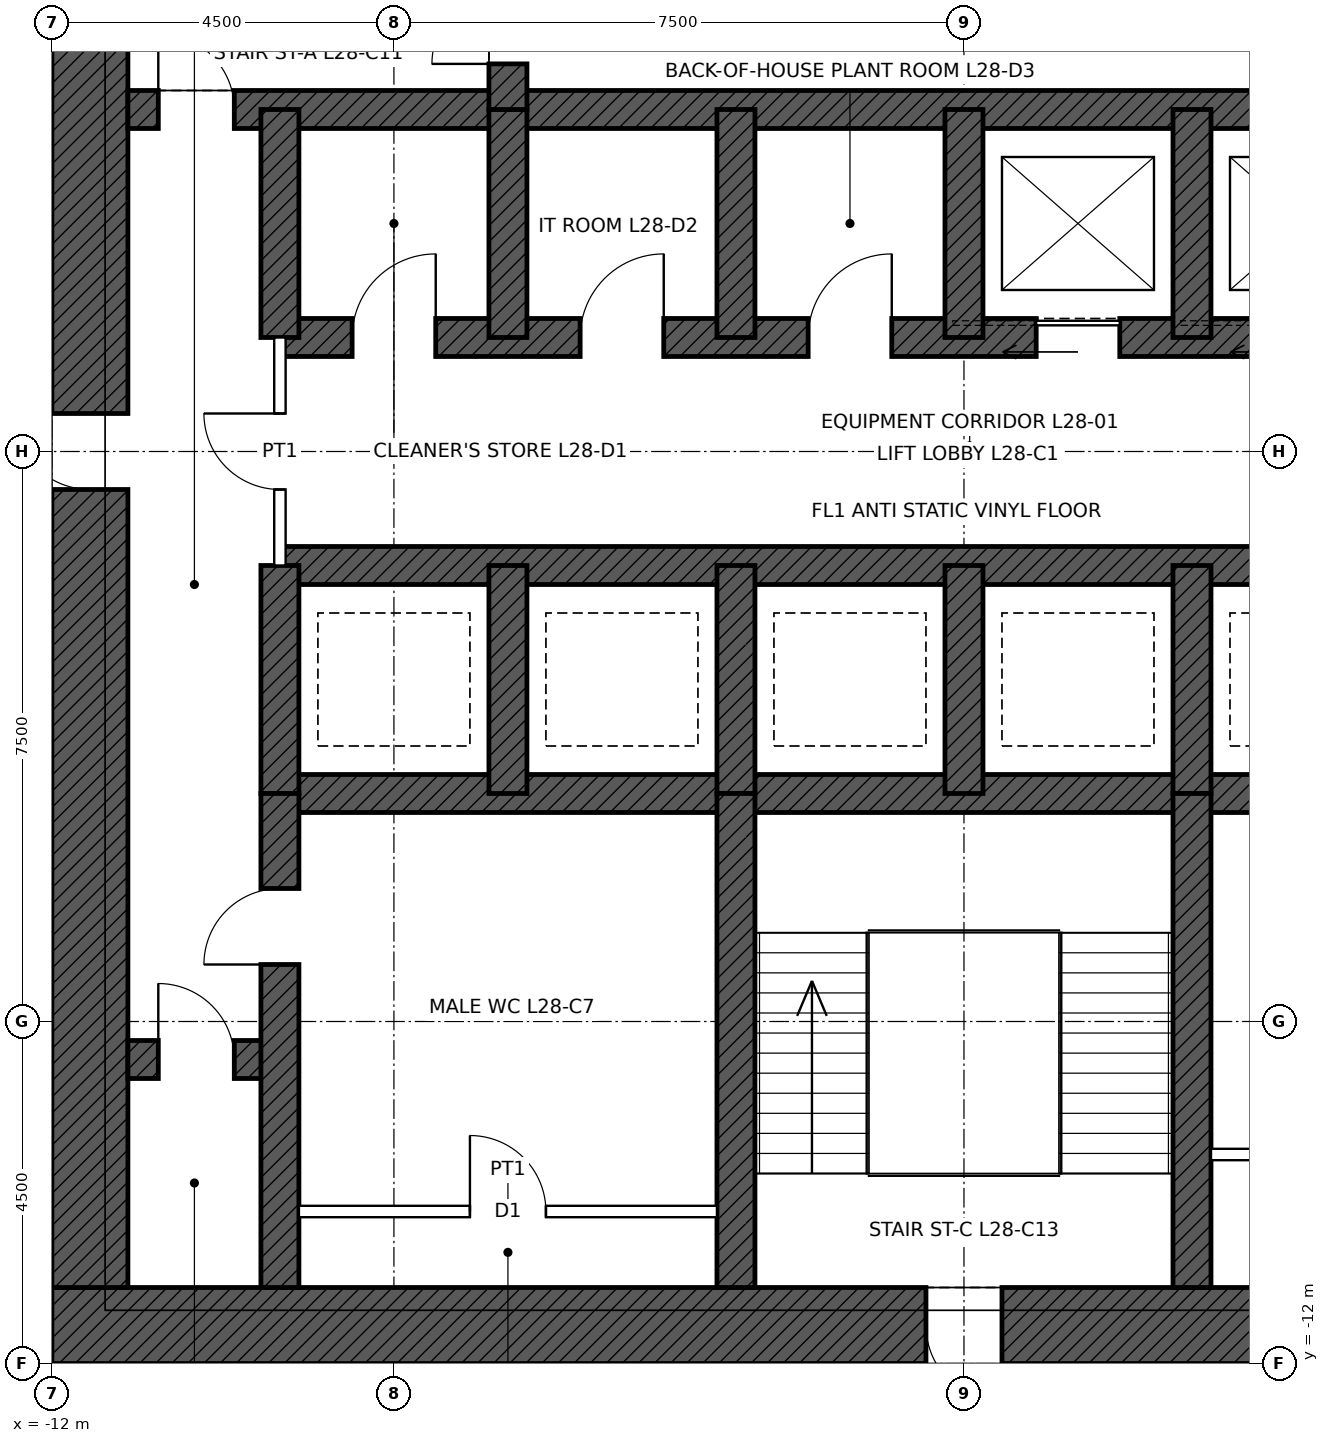
"""IFC4 building model, lengths in metres.
Left out: names, types, materials, properties, quantities, classifications, styles, units other than length and angle.
Written with IfcOpenShell. Run it as: python <this file> out.ifc"""

import sys

from ifc_helpers import new_model, si_unit, direction, frame, frame_2d, origin, place, context, subcontext, project, spatial, rectangle, extrude, element, fill, save


model = new_model("IFC4")
c1 = context("Model", 3, precision=1e-05, world=origin(), true_north=direction((0.0, 1.0)))
c2 = subcontext(c1, "Body", "Model", "MODEL_VIEW")
j1 = project(units=[si_unit("LENGTHUNIT", "METRE"), si_unit("PLANEANGLEUNIT", "RADIAN")], contexts=[c1])
p1 = place(None, origin())
s1 = spatial("IfcSite", under=j1, at=p1, CompositionType="ELEMENT")
p2 = place(p1, origin())
s2 = spatial("IfcBuilding", under=s1, at=p2, CompositionType="ELEMENT")
p3 = place(p2, frame((0.0, 0.0, 140.4)))
s3 = spatial("IfcBuildingStorey", under=s2, at=p3, CompositionType="ELEMENT", Elevation=140.4)
p4 = place(p3, frame((12.0, -11.5, 0.0), z_axis=(0.0, 0.0, 1.0), x_axis=(-1.0, 0.0, 0.0)))
e1 = element("IfcWall", 1, at=p4, inside=s3, PredefinedType="SHEAR", context=c2, shape_type="SweptSolid", body=[
    extrude(rectangle(XDim=24.0, YDim=1.0, at=frame_2d((12.0, 0.0))), origin(), (0.0, 0.0, 1.0), 4.5),
])
p5 = place(p4, frame((11.5, 0.0, 0.0)))
e2 = element("IfcOpeningElement", 2, at=p5, cuts=e1, PredefinedType="OPENING", context=c2, shape_type="SweptSolid", body=[
    extrude(rectangle(XDim=1.0, YDim=2.1, at=frame_2d((0.5, 1.05))), frame((0.0, 0.51, 0.0), z_axis=(0.0, -1.0, 0.0), x_axis=(1.0, 0.0, 0.0)), (0.0, 0.0, 1.0), 1.02),
])
p6 = place(p4, frame((1.0, 0.0, 0.0)))
e3 = element("IfcOpeningElement", 3, at=p6, cuts=e1, PredefinedType="OPENING", context=c2, shape_type="SweptSolid", body=[
    extrude(rectangle(XDim=1.0, YDim=2.4, at=frame_2d((0.5, 1.2))), frame((0.0, 0.51, 0.0), z_axis=(0.0, -1.0, 0.0), x_axis=(1.0, 0.0, 0.0)), (0.0, 0.0, 1.0), 1.02),
])
p7 = place(p3, frame((-11.5, -11.0, 0.0), z_axis=(0.0, 0.0, 1.0), x_axis=(0.0, 1.0, 0.0)))
e4 = element("IfcWall", 4, at=p7, inside=s3, PredefinedType="SHEAR", context=c2, shape_type="SweptSolid", body=[
    extrude(rectangle(XDim=22.0, YDim=1.0, at=frame_2d((11.0, 0.0))), origin(), (0.0, 0.0, 1.0), 4.5),
])
p8 = place(p7, frame((10.5, 0.0, 0.0)))
e5 = element("IfcOpeningElement", 5, at=p8, cuts=e4, PredefinedType="OPENING", context=c2, shape_type="SweptSolid", body=[
    extrude(rectangle(XDim=1.0, YDim=2.4, at=frame_2d((0.5, 1.2))), frame((0.0, 0.51, 0.0), z_axis=(0.0, -1.0, 0.0), x_axis=(1.0, 0.0, 0.0)), (0.0, 0.0, 1.0), 1.02),
])
p9 = place(p3, frame((-11.0, 4.5, 0.0), z_axis=(0.0, 0.0, 1.0), x_axis=(1.0, 0.0, 0.0)))
e6 = element("IfcWall", 6, at=p9, inside=s3, PredefinedType="SHEAR", context=c2, shape_type="SweptSolid", body=[
    extrude(rectangle(XDim=22.0, YDim=0.5, at=frame_2d((11.0, 0.0))), origin(), (0.0, 0.0, 1.0), 4.5),
])
p10 = place(p9, frame((0.4, 0.0, 0.0)))
e7 = element("IfcOpeningElement", 7, at=p10, cuts=e6, PredefinedType="OPENING", context=c2, shape_type="SweptSolid", body=[
    extrude(rectangle(XDim=1.0, YDim=2.1, at=frame_2d((0.5, 1.05))), frame((0.0, 0.26, 0.0), z_axis=(0.0, -1.0, 0.0), x_axis=(1.0, 0.0, 0.0)), (0.0, 0.0, 1.0), 0.52),
])
p11 = place(p9, frame((20.6, 0.0, 0.0)))
e8 = element("IfcOpeningElement", 8, at=p11, cuts=e6, PredefinedType="OPENING", context=c2, shape_type="SweptSolid", body=[
    extrude(rectangle(XDim=1.0, YDim=2.1, at=frame_2d((0.5, 1.05))), frame((0.0, 0.26, 0.0), z_axis=(0.0, -1.0, 0.0), x_axis=(1.0, 0.0, 0.0)), (0.0, 0.0, 1.0), 0.52),
])
p12 = place(p3, frame((-9.0, 1.5, 0.0), z_axis=(0.0, 0.0, 1.0), x_axis=(1.0, 0.0, 0.0)))
e9 = element("IfcWall", 9, at=p12, inside=s3, PredefinedType="SHEAR", context=c2, shape_type="SweptSolid", body=[
    extrude(rectangle(XDim=18.0, YDim=0.5, at=frame_2d((9.0, 0.0))), origin(), (0.0, 0.0, 1.0), 4.5),
])
p13 = place(p12, frame((9.95, 0.0, 0.0)))
e10 = element("IfcOpeningElement", 10, at=p13, cuts=e9, PredefinedType="OPENING", context=c2, shape_type="SweptSolid", body=[
    extrude(rectangle(XDim=1.1, YDim=2.1, at=frame_2d((0.55, 1.05))), frame((0.0, 0.26, 0.0), z_axis=(0.0, -1.0, 0.0), x_axis=(1.0, 0.0, 0.0)), (0.0, 0.0, 1.0), 0.52),
])
p14 = place(p12, frame((12.95, 0.0, 0.0)))
e11 = element("IfcOpeningElement", 11, at=p14, cuts=e9, PredefinedType="OPENING", context=c2, shape_type="SweptSolid", body=[
    extrude(rectangle(XDim=1.1, YDim=2.1, at=frame_2d((0.55, 1.05))), frame((0.0, 0.26, 0.0), z_axis=(0.0, -1.0, 0.0), x_axis=(1.0, 0.0, 0.0)), (0.0, 0.0, 1.0), 0.52),
])
p15 = place(p12, frame((15.95, 0.0, 0.0)))
e12 = element("IfcOpeningElement", 12, at=p15, cuts=e9, PredefinedType="OPENING", context=c2, shape_type="SweptSolid", body=[
    extrude(rectangle(XDim=1.1, YDim=2.1, at=frame_2d((0.55, 1.05))), frame((0.0, 0.26, 0.0), z_axis=(0.0, -1.0, 0.0), x_axis=(1.0, 0.0, 0.0)), (0.0, 0.0, 1.0), 0.52),
])
p16 = place(p12, frame((0.95, 0.0, 0.0)))
e13 = element("IfcOpeningElement", 13, at=p16, cuts=e9, PredefinedType="OPENING", context=c2, shape_type="SweptSolid", body=[
    extrude(rectangle(XDim=1.1, YDim=2.1, at=frame_2d((0.55, 1.05))), frame((0.0, 0.26, 0.0), z_axis=(0.0, -1.0, 0.0), x_axis=(1.0, 0.0, 0.0)), (0.0, 0.0, 1.0), 0.52),
])
p17 = place(p12, frame((3.95, 0.0, 0.0)))
e14 = element("IfcOpeningElement", 14, at=p17, cuts=e9, PredefinedType="OPENING", context=c2, shape_type="SweptSolid", body=[
    extrude(rectangle(XDim=1.1, YDim=2.1, at=frame_2d((0.55, 1.05))), frame((0.0, 0.26, 0.0), z_axis=(0.0, -1.0, 0.0), x_axis=(1.0, 0.0, 0.0)), (0.0, 0.0, 1.0), 0.52),
])
p18 = place(p12, frame((6.95, 0.0, 0.0)))
e15 = element("IfcOpeningElement", 15, at=p18, cuts=e9, PredefinedType="OPENING", context=c2, shape_type="SweptSolid", body=[
    extrude(rectangle(XDim=1.1, YDim=2.1, at=frame_2d((0.55, 1.05))), frame((0.0, 0.26, 0.0), z_axis=(0.0, -1.0, 0.0), x_axis=(1.0, 0.0, 0.0)), (0.0, 0.0, 1.0), 0.52),
])
for number, where, z_axis, x_axis in (
    (16, (-9.0, -1.5, 0.0), (0.0, 0.0, 1.0), (1.0, 0.0, 0.0)),
    (17, (-9.0, -4.5, 0.0), (0.0, 0.0, 1.0), (1.0, 0.0, 0.0)),
):
    element("IfcWall", number, at=place(p3, frame(where, z_axis=z_axis, x_axis=x_axis)), inside=s3, PredefinedType="SHEAR", context=c2, shape_type="SweptSolid", body=[
        extrude(rectangle(XDim=18.0, YDim=0.5, at=frame_2d((9.0, 0.0))), origin(), (0.0, 0.0, 1.0), 4.5),
    ])
p19 = place(p3, frame((-11.0, -8.0, 0.0), z_axis=(0.0, 0.0, 1.0), x_axis=(1.0, 0.0, 0.0)))
e18 = element("IfcWall", 18, at=p19, inside=s3, PredefinedType="SHEAR", context=c2, shape_type="SweptSolid", body=[
    extrude(rectangle(XDim=2.0, YDim=0.5, at=frame_2d((1.0, 0.0))), origin(), (0.0, 0.0, 1.0), 4.5),
])
p20 = place(p19, frame((0.4, 0.0, 0.0)))
e19 = element("IfcOpeningElement", 19, at=p20, cuts=e18, PredefinedType="OPENING", context=c2, shape_type="SweptSolid", body=[
    extrude(rectangle(XDim=1.0, YDim=2.1, at=frame_2d((0.5, 1.05))), frame((0.0, 0.26, 0.0), z_axis=(0.0, -1.0, 0.0), x_axis=(1.0, 0.0, 0.0)), (0.0, 0.0, 1.0), 0.52),
])
for number, where, z_axis, x_axis in (
    (20, (-9.0, 1.5, 0.0), (0.0, 0.0, 1.0), (0.0, 1.0, 0.0)),
    (21, (-9.0, -4.5, 0.0), (0.0, 0.0, 1.0), (0.0, 1.0, 0.0)),
    (22, (-6.0, 1.5, 0.0), (0.0, 0.0, 1.0), (0.0, 1.0, 0.0)),
    (23, (-3.0, 1.5, 0.0), (0.0, 0.0, 1.0), (0.0, 1.0, 0.0)),
    (24, (0.0, 1.5, 0.0), (0.0, 0.0, 1.0), (0.0, 1.0, 0.0)),
    (25, (3.0, 1.5, 0.0), (0.0, 0.0, 1.0), (0.0, 1.0, 0.0)),
    (26, (-6.0, -4.5, 0.0), (0.0, 0.0, 1.0), (0.0, 1.0, 0.0)),
    (27, (-3.0, -4.5, 0.0), (0.0, 0.0, 1.0), (0.0, 1.0, 0.0)),
    (28, (0.0, -4.5, 0.0), (0.0, 0.0, 1.0), (0.0, 1.0, 0.0)),
    (29, (3.0, -4.5, 0.0), (0.0, 0.0, 1.0), (0.0, 1.0, 0.0)),
):
    element("IfcWall", number, at=place(p3, frame(where, z_axis=z_axis, x_axis=x_axis)), inside=s3, PredefinedType="SHEAR", context=c2, shape_type="SweptSolid", body=[
        extrude(rectangle(XDim=3.0, YDim=0.5, at=frame_2d((1.5, 0.0))), origin(), (0.0, 0.0, 1.0), 4.5),
    ])
p21 = place(p3, frame((-6.0, 4.5, 0.0), z_axis=(0.0, 0.0, 1.0), x_axis=(0.0, 1.0, 0.0)))
e30 = element("IfcWall", 30, at=p21, inside=s3, PredefinedType="SHEAR", context=c2, shape_type="SweptSolid", body=[
    extrude(rectangle(XDim=6.5, YDim=0.5, at=frame_2d((3.25, 0.0))), origin(), (0.0, 0.0, 1.0), 4.5),
])
p22 = place(p21, frame((0.6, 0.0, 0.0)))
e31 = element("IfcOpeningElement", 31, at=p22, cuts=e30, PredefinedType="OPENING", context=c2, shape_type="SweptSolid", body=[
    extrude(rectangle(XDim=1.0, YDim=2.1, at=frame_2d((0.5, 1.05))), frame((0.0, 0.26, 0.0), z_axis=(0.0, -1.0, 0.0), x_axis=(1.0, 0.0, 0.0)), (0.0, 0.0, 1.0), 0.52),
])
p23 = place(p3, frame((-9.0, -11.0, 0.0), z_axis=(0.0, 0.0, 1.0), x_axis=(0.0, 1.0, 0.0)))
e32 = element("IfcWall", 32, at=p23, inside=s3, PredefinedType="SHEAR", context=c2, shape_type="SweptSolid", body=[
    extrude(rectangle(XDim=6.5, YDim=0.5, at=frame_2d((3.25, 0.0))), origin(), (0.0, 0.0, 1.0), 4.5),
])
p24 = place(p23, frame((4.25, 0.0, 0.0)))
e33 = element("IfcOpeningElement", 33, at=p24, cuts=e32, PredefinedType="OPENING", context=c2, shape_type="SweptSolid", body=[
    extrude(rectangle(XDim=1.0, YDim=2.1, at=frame_2d((0.5, 1.05))), frame((0.0, 0.26, 0.0), z_axis=(0.0, -1.0, 0.0), x_axis=(1.0, 0.0, 0.0)), (0.0, 0.0, 1.0), 0.52),
])
for number, where, z_axis, x_axis in (
    (34, (-3.0, -11.0, 0.0), (0.0, 0.0, 1.0), (0.0, 1.0, 0.0)),
    (35, (3.0, -11.0, 0.0), (0.0, 0.0, 1.0), (0.0, 1.0, 0.0)),
):
    element("IfcWall", number, at=place(p3, frame(where, z_axis=z_axis, x_axis=x_axis)), inside=s3, PredefinedType="SHEAR", context=c2, shape_type="SweptSolid", body=[
        extrude(rectangle(XDim=6.5, YDim=0.5, at=frame_2d((3.25, 0.0))), origin(), (0.0, 0.0, 1.0), 4.5),
    ])
p25 = place(p3, frame((-8.75, -10.0, 0.0), z_axis=(0.0, 0.0, 1.0), x_axis=(1.0, 0.0, 0.0)))
e36 = element("IfcWall", 36, at=p25, inside=s3, PredefinedType="PARTITIONING", context=c2, shape_type="SweptSolid", body=[
    extrude(rectangle(XDim=5.5, YDim=0.15, at=frame_2d((2.75, 0.0))), origin(), (0.0, 0.0, 1.0), 4.25),
])
p26 = place(p25, frame((2.25, 0.0, 0.0)))
e37 = element("IfcOpeningElement", 37, at=p26, cuts=e36, PredefinedType="OPENING", context=c2, shape_type="SweptSolid", body=[
    extrude(rectangle(XDim=1.0, YDim=2.1, at=frame_2d((0.5, 1.05))), frame((0.0, 0.085, 0.0), z_axis=(0.0, -1.0, 0.0), x_axis=(1.0, 0.0, 0.0)), (0.0, 0.0, 1.0), 0.17),
])
p27 = place(p3, frame((3.25, -9.25, 0.0), z_axis=(0.0, 0.0, 1.0), x_axis=(1.0, 0.0, 0.0)))
e38 = element("IfcWall", 38, at=p27, inside=s3, PredefinedType="PARTITIONING", context=c2, shape_type="SweptSolid", body=[
    extrude(rectangle(XDim=5.5, YDim=0.15, at=frame_2d((2.75, 0.0))), origin(), (0.0, 0.0, 1.0), 4.25),
])
p28 = place(p27, frame((2.25, 0.0, 0.0)))
e39 = element("IfcOpeningElement", 39, at=p28, cuts=e38, PredefinedType="OPENING", context=c2, shape_type="SweptSolid", body=[
    extrude(rectangle(XDim=1.0, YDim=2.1, at=frame_2d((0.5, 1.05))), frame((0.0, 0.085, 0.0), z_axis=(0.0, -1.0, 0.0), x_axis=(1.0, 0.0, 0.0)), (0.0, 0.0, 1.0), 0.17),
])
p29 = place(p3, frame((-9.0, -1.5, 0.0), z_axis=(0.0, 0.0, 1.0), x_axis=(0.0, 1.0, 0.0)))
e40 = element("IfcWall", 40, at=p29, inside=s3, PredefinedType="PARTITIONING", context=c2, shape_type="SweptSolid", body=[
    extrude(rectangle(XDim=3.0, YDim=0.15, at=frame_2d((1.5, 0.0))), origin(), (0.0, 0.0, 1.0), 4.25),
])
p30 = place(p29, frame((1.0, 0.0, 0.0)))
e41 = element("IfcOpeningElement", 41, at=p30, cuts=e40, PredefinedType="OPENING", context=c2, shape_type="SweptSolid", body=[
    extrude(rectangle(XDim=1.0, YDim=2.4, at=frame_2d((0.5, 1.2))), frame((0.0, 0.085, 0.0), z_axis=(0.0, -1.0, 0.0), x_axis=(1.0, 0.0, 0.0)), (0.0, 0.0, 1.0), 0.17),
])
p31 = place(p10, origin())
e42 = element("IfcDoor", 42, at=p31, inside=s3, OperationType="SINGLE_SWING_LEFT", PredefinedType="DOOR", context=c2, shape_type="SweptSolid", body=[
    extrude(rectangle(XDim=1.0, YDim=2.1, at=frame_2d((0.5, 1.05))), frame((0.0, 0.025, 0.0), z_axis=(0.0, -1.0, 0.0), x_axis=(1.0, 0.0, 0.0)), (0.0, 0.0, 1.0), 0.05),
])
fill(e7, e42)
p32 = place(p22, origin())
e43 = element("IfcDoor", 43, at=p32, inside=s3, OperationType="SINGLE_SWING_LEFT", PredefinedType="DOOR", context=c2, shape_type="SweptSolid", body=[
    extrude(rectangle(XDim=1.0, YDim=2.1, at=frame_2d((0.5, 1.05))), frame((0.0, 0.025, 0.0), z_axis=(0.0, -1.0, 0.0), x_axis=(1.0, 0.0, 0.0)), (0.0, 0.0, 1.0), 0.05),
])
fill(e31, e43)
p33 = place(p5, origin())
e44 = element("IfcDoor", 44, at=p33, inside=s3, OperationType="SINGLE_SWING_LEFT", PredefinedType="DOOR", context=c2, shape_type="SweptSolid", body=[
    extrude(rectangle(XDim=1.0, YDim=2.1, at=frame_2d((0.5, 1.05))), frame((0.0, 0.485, 0.0), z_axis=(0.0, -1.0, 0.0), x_axis=(1.0, 0.0, 0.0)), (0.0, 0.0, 1.0), 0.05),
])
fill(e2, e44)
p34 = place(p8, origin())
e45 = element("IfcDoor", 45, at=p34, inside=s3, OperationType="SINGLE_SWING_RIGHT", PredefinedType="DOOR", context=c2, shape_type="SweptSolid", body=[
    extrude(rectangle(XDim=1.0, YDim=2.4, at=frame_2d((0.5, 1.2))), frame((0.0, 0.485, 0.0), z_axis=(0.0, -1.0, 0.0), x_axis=(1.0, 0.0, 0.0)), (0.0, 0.0, 1.0), 0.05),
])
fill(e5, e45)
p35 = place(p24, origin())
e46 = element("IfcDoor", 46, at=p35, inside=s3, OperationType="SINGLE_SWING_LEFT", PredefinedType="DOOR", context=c2, shape_type="SweptSolid", body=[
    extrude(rectangle(XDim=1.0, YDim=2.1, at=frame_2d((0.5, 1.05))), frame((0.0, 0.025, 0.0), z_axis=(0.0, -1.0, 0.0), x_axis=(1.0, 0.0, 0.0)), (0.0, 0.0, 1.0), 0.05),
])
fill(e33, e46)
p36 = place(p20, origin())
e47 = element("IfcDoor", 47, at=p36, inside=s3, OperationType="SINGLE_SWING_LEFT", PredefinedType="DOOR", context=c2, shape_type="SweptSolid", body=[
    extrude(rectangle(XDim=1.0, YDim=2.1, at=frame_2d((0.5, 1.05))), frame((0.0, 0.025, 0.0), z_axis=(0.0, -1.0, 0.0), x_axis=(1.0, 0.0, 0.0)), (0.0, 0.0, 1.0), 0.05),
])
fill(e19, e47)
p37 = place(p13, origin())
e48 = element("IfcDoor", 48, at=p37, inside=s3, OperationType="SLIDING_TO_LEFT", PredefinedType="DOOR", context=c2, shape_type="SweptSolid", body=[
    extrude(rectangle(XDim=1.1, YDim=2.1, at=frame_2d((0.55, 1.05))), frame((0.0, 0.025, 0.0), z_axis=(0.0, -1.0, 0.0), x_axis=(1.0, 0.0, 0.0)), (0.0, 0.0, 1.0), 0.05),
])
fill(e10, e48)
p38 = place(p26, origin())
e49 = element("IfcDoor", 49, at=p38, inside=s3, OperationType="SINGLE_SWING_LEFT", PredefinedType="DOOR", context=c2, shape_type="SweptSolid", body=[
    extrude(rectangle(XDim=1.0, YDim=2.1, at=frame_2d((0.5, 1.05))), frame((0.0, 0.025, 0.0), z_axis=(0.0, -1.0, 0.0), x_axis=(1.0, 0.0, 0.0)), (0.0, 0.0, 1.0), 0.05),
])
fill(e37, e49)
p39 = place(p30, origin())
e50 = element("IfcDoor", 50, at=p39, inside=s3, OperationType="SINGLE_SWING_RIGHT", PredefinedType="DOOR", context=c2, shape_type="SweptSolid", body=[
    extrude(rectangle(XDim=1.0, YDim=2.4, at=frame_2d((0.5, 1.2))), frame((0.0, 0.025, 0.0), z_axis=(0.0, -1.0, 0.0), x_axis=(1.0, 0.0, 0.0)), (0.0, 0.0, 1.0), 0.05),
])
fill(e41, e50)
p40 = place(p16, origin())
e51 = element("IfcDoor", 51, at=p40, inside=s3, OperationType="SINGLE_SWING_RIGHT", PredefinedType="DOOR", context=c2, shape_type="SweptSolid", body=[
    extrude(rectangle(XDim=1.1, YDim=2.1, at=frame_2d((0.55, 1.05))), frame((0.0, 0.025, 0.0), z_axis=(0.0, -1.0, 0.0), x_axis=(1.0, 0.0, 0.0)), (0.0, 0.0, 1.0), 0.05),
])
fill(e13, e51)
p41 = place(p17, origin())
e52 = element("IfcDoor", 52, at=p41, inside=s3, OperationType="SINGLE_SWING_RIGHT", PredefinedType="DOOR", context=c2, shape_type="SweptSolid", body=[
    extrude(rectangle(XDim=1.1, YDim=2.1, at=frame_2d((0.55, 1.05))), frame((0.0, 0.025, 0.0), z_axis=(0.0, -1.0, 0.0), x_axis=(1.0, 0.0, 0.0)), (0.0, 0.0, 1.0), 0.05),
])
fill(e14, e52)
p42 = place(p18, origin())
e53 = element("IfcDoor", 53, at=p42, inside=s3, OperationType="SINGLE_SWING_RIGHT", PredefinedType="DOOR", context=c2, shape_type="SweptSolid", body=[
    extrude(rectangle(XDim=1.1, YDim=2.1, at=frame_2d((0.55, 1.05))), frame((0.0, 0.025, 0.0), z_axis=(0.0, -1.0, 0.0), x_axis=(1.0, 0.0, 0.0)), (0.0, 0.0, 1.0), 0.05),
])
fill(e15, e53)
save(model, sys.argv[1])
